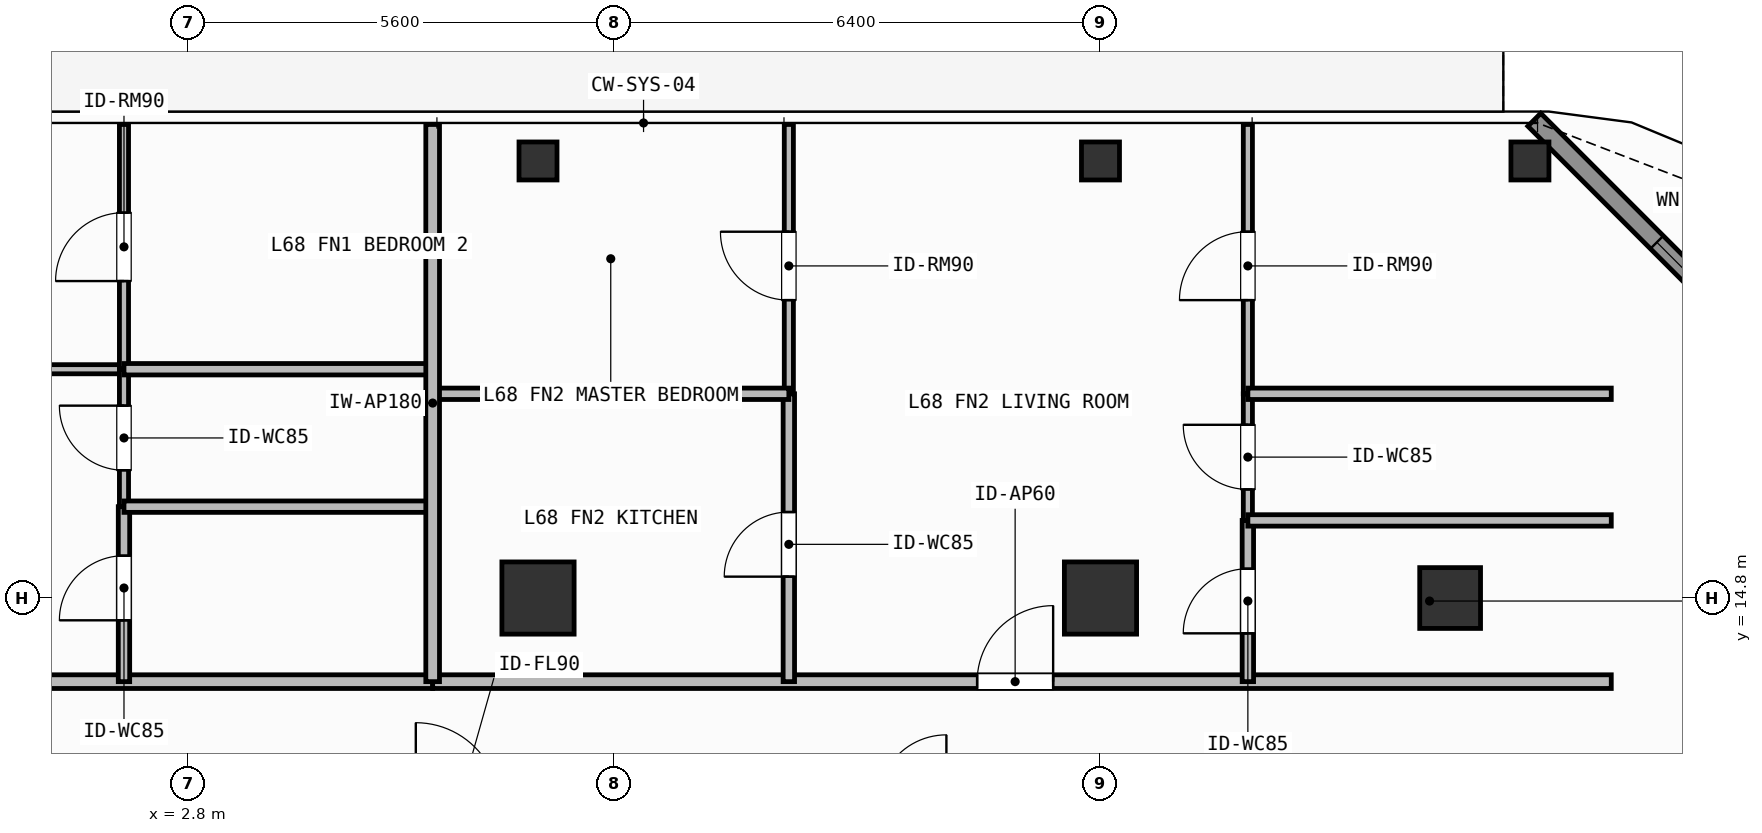
"""IFC4 building model, lengths in metres.
Left out: names, types, materials, properties, quantities, classifications, styles, units other than length and angle.
Written with IfcOpenShell. Run it as: python <this file> out.ifc"""

import sys

from ifc_helpers import new_model, si_unit, direction, frame, frame_2d, origin, origin_2d, place, context, subcontext, project, spatial, rectangle, hollow_rectangle, extrude, element, fill, save


model = new_model("IFC4")
c1 = context("Model", 3, precision=1e-05, world=origin(), true_north=direction((0.0, 1.0)))
c2 = subcontext(c1, "Body", "Model", "MODEL_VIEW")
j1 = project(units=[si_unit("LENGTHUNIT", "METRE"), si_unit("PLANEANGLEUNIT", "RADIAN")], contexts=[c1])
p1 = place(None, origin())
s1 = spatial("IfcSite", under=j1, at=p1, CompositionType="ELEMENT")
p2 = place(p1, origin())
s2 = spatial("IfcBuilding", under=s1, at=p2, CompositionType="ELEMENT")
p3 = place(p2, frame((0.0, 0.0, 278.1)))
s3 = spatial("IfcBuildingStorey", under=s2, at=p3, CompositionType="ELEMENT", Elevation=278.1)
for number, where, z_axis, x_axis in (
    (1, (7.4, 14.8, 0.0), (0.0, 0.0, 1.0), (1.0, 0.0, 0.0)),
    (2, (14.8, 14.8, 0.0), (0.0, 0.0, 1.0), (1.0, 0.0, 0.0)),
):
    element("IfcColumn", number, at=place(p3, frame(where, z_axis=z_axis, x_axis=x_axis)), inside=s3, PredefinedType="COLUMN", context=c2, shape_type="SweptSolid", body=[
        extrude(rectangle(XDim=0.95, YDim=0.95, at=origin_2d()), origin(), (0.0, 0.0, 1.0), 3.9),
    ])
p4 = place(p3, frame((19.4, 14.8, 0.0), z_axis=(0.0, 0.0, 1.0), x_axis=(1.0, 0.0, 0.0)))
e3 = element("IfcColumn", 3, at=p4, inside=s3, PredefinedType="COLUMN", context=c2, shape_type="SweptSolid", body=[
    extrude(hollow_rectangle(XDim=0.8, YDim=0.8, WallThickness=0.036, at=origin_2d()), origin(), (0.0, 0.0, 1.0), 3.9),
])
for number, where, z_axis, x_axis in (
    (4, (20.45, 20.55, 0.0), (0.0, 0.0, 1.0), (1.0, 0.0, 0.0)),
    (5, (7.4, 20.55, 0.0), (0.0, 0.0, 1.0), (1.0, 0.0, 0.0)),
    (6, (14.8, 20.55, 0.0), (0.0, 0.0, 1.0), (1.0, 0.0, 0.0)),
):
    element("IfcColumn", number, at=place(p3, frame(where, z_axis=z_axis, x_axis=x_axis)), inside=s3, PredefinedType="COLUMN", context=c2, shape_type="SweptSolid", body=[
        extrude(hollow_rectangle(XDim=0.5, YDim=0.5, WallThickness=0.025, at=origin_2d()), origin(), (0.0, 0.0, 1.0), 3.9),
    ])
p5 = place(p3, frame((20.508, 21.092, 0.0), z_axis=(0.0, 0.0, 1.0), x_axis=(0.707126925818, -0.707086635981, 0.0)))
e7 = element("IfcWall", 7, at=p5, inside=s3, PredefinedType="SOLIDWALL", context=c2, shape_type="SweptSolid", body=[
    extrude(rectangle(XDim=6.06, YDim=0.24, at=frame_2d((3.03, 0.0))), origin(), (0.0, 0.0, 1.0), 3.68),
])
p6 = place(p5, frame((2.28, 0.0, 0.8)))
e8 = element("IfcOpeningElement", 8, at=p6, cuts=e7, PredefinedType="OPENING", context=c2, shape_type="SweptSolid", body=[
    extrude(rectangle(XDim=1.5, YDim=1.85, at=frame_2d((0.75, 0.925))), frame((0.0, 0.13, 0.0), z_axis=(0.0, -1.0, 0.0), x_axis=(1.0, 0.0, 0.0)), (0.0, 0.0, 1.0), 0.26),
])
p7 = place(p3, frame((-13.72, 13.7, 0.0), z_axis=(0.0, 0.0, 1.0), x_axis=(1.0, 0.0, 0.0)))
e9 = element("IfcWall", 9, at=p7, inside=s3, PredefinedType="PARTITIONING", context=c2, shape_type="SweptSolid", body=[
    extrude(rectangle(XDim=19.734, YDim=0.18, at=frame_2d((9.867, 0.0))), origin(), (0.0, 0.0, 1.0), 3.68),
])
p8 = place(p7, frame((9.456, 0.0, 0.0)))
e10 = element("IfcOpeningElement", 10, at=p8, cuts=e9, PredefinedType="OPENING", context=c2, shape_type="SweptSolid", body=[
    extrude(rectangle(XDim=1.0, YDim=2.2, at=frame_2d((0.5, 1.1))), frame((0.0, 0.1, 0.0), z_axis=(0.0, -1.0, 0.0), x_axis=(1.0, 0.0, 0.0)), (0.0, 0.0, 1.0), 0.2),
])
p9 = place(p3, frame((-9.34, 17.81, 0.0), z_axis=(0.0, 0.0, 1.0), x_axis=(1.0, 0.0, 0.0)))
e11 = element("IfcWall", 11, at=p9, inside=s3, PredefinedType="PARTITIONING", context=c2, shape_type="SweptSolid", body=[
    extrude(rectangle(XDim=11.293, YDim=0.12, at=frame_2d((5.646, 0.0))), origin(), (0.0, 0.0, 1.0), 3.68),
])
p10 = place(p9, frame((5.197, 0.0, 0.0)))
e12 = element("IfcOpeningElement", 12, at=p10, cuts=e11, PredefinedType="OPENING", context=c2, shape_type="SweptSolid", body=[
    extrude(rectangle(XDim=0.9, YDim=2.1, at=frame_2d((0.45, 1.05))), frame((0.0, 0.07, 0.0), z_axis=(0.0, -1.0, 0.0), x_axis=(1.0, 0.0, 0.0)), (0.0, 0.0, 1.0), 0.14),
])
p11 = place(p3, frame((1.953, 13.7, 0.0), z_axis=(0.0, 0.0, 1.0), x_axis=(0.0, 1.0, 0.0)))
e13 = element("IfcWall", 13, at=p11, inside=s3, PredefinedType="PARTITIONING", context=c2, shape_type="SweptSolid", body=[
    extrude(rectangle(XDim=2.302, YDim=0.15, at=frame_2d((1.151, 0.0))), origin(), (0.0, 0.0, 1.0), 3.68),
])
p12 = place(p11, frame((0.807, 0.0, 0.0)))
e14 = element("IfcOpeningElement", 14, at=p12, cuts=e13, PredefinedType="OPENING", context=c2, shape_type="SweptSolid", body=[
    extrude(rectangle(XDim=0.85, YDim=2.1, at=frame_2d((0.425, 1.05))), frame((0.0, 0.085, 0.0), z_axis=(0.0, -1.0, 0.0), x_axis=(1.0, 0.0, 0.0)), (0.0, 0.0, 1.0), 0.17),
])
p13 = place(p3, frame((1.953, 16.002, 0.0), z_axis=(0.0, 0.0, 1.0), x_axis=(0.0, 1.0, 0.0)))
e15 = element("IfcWall", 15, at=p13, inside=s3, PredefinedType="PARTITIONING", context=c2, shape_type="SweptSolid", body=[
    extrude(rectangle(XDim=1.808, YDim=0.12, at=frame_2d((0.904, 0.0))), origin(), (0.0, 0.0, 1.0), 3.68),
])
p14 = place(p13, frame((0.479, 0.0, 0.0)))
e16 = element("IfcOpeningElement", 16, at=p14, cuts=e15, PredefinedType="OPENING", context=c2, shape_type="SweptSolid", body=[
    extrude(rectangle(XDim=0.85, YDim=2.1, at=frame_2d((0.425, 1.05))), frame((0.0, 0.07, 0.0), z_axis=(0.0, -1.0, 0.0), x_axis=(1.0, 0.0, 0.0)), (0.0, 0.0, 1.0), 0.14),
])
p15 = place(p3, frame((1.953, 17.81, 0.0), z_axis=(0.0, 0.0, 1.0), x_axis=(0.0, 1.0, 0.0)))
e17 = element("IfcWall", 17, at=p15, inside=s3, PredefinedType="PARTITIONING", context=c2, shape_type="SweptSolid", body=[
    extrude(rectangle(XDim=3.22, YDim=0.12, at=frame_2d((1.61, 0.0))), origin(), (0.0, 0.0, 1.0), 3.68),
])
p16 = place(p15, frame((1.16, 0.0, 0.0)))
e18 = element("IfcOpeningElement", 18, at=p16, cuts=e17, PredefinedType="OPENING", context=c2, shape_type="SweptSolid", body=[
    extrude(rectangle(XDim=0.9, YDim=2.1, at=frame_2d((0.45, 1.05))), frame((0.0, 0.07, 0.0), z_axis=(0.0, -1.0, 0.0), x_axis=(1.0, 0.0, 0.0)), (0.0, 0.0, 1.0), 0.14),
])
p17 = place(p3, frame((6.014, 13.7, 0.0), z_axis=(0.0, 0.0, 1.0), x_axis=(1.0, 0.0, 0.0)))
e19 = element("IfcWall", 19, at=p17, inside=s3, PredefinedType="PARTITIONING", context=c2, shape_type="SweptSolid", body=[
    extrude(rectangle(XDim=15.506, YDim=0.18, at=frame_2d((7.753, 0.0))), origin(), (0.0, 0.0, 1.0), 3.68),
])
p18 = place(p17, frame((7.163, 0.0, 0.0)))
e20 = element("IfcOpeningElement", 20, at=p18, cuts=e19, PredefinedType="OPENING", context=c2, shape_type="SweptSolid", body=[
    extrude(rectangle(XDim=1.0, YDim=2.2, at=frame_2d((0.5, 1.1))), frame((0.0, 0.1, 0.0), z_axis=(0.0, -1.0, 0.0), x_axis=(1.0, 0.0, 0.0)), (0.0, 0.0, 1.0), 0.2),
])
p19 = place(p3, frame((10.7, 13.7, 0.0), z_axis=(0.0, 0.0, 1.0), x_axis=(0.0, 1.0, 0.0)))
e21 = element("IfcWall", 21, at=p19, inside=s3, PredefinedType="PARTITIONING", context=c2, shape_type="SweptSolid", body=[
    extrude(rectangle(XDim=3.787, YDim=0.15, at=frame_2d((1.894, 0.0))), origin(), (0.0, 0.0, 1.0), 3.68),
])
p20 = place(p19, frame((1.381, 0.0, 0.0)))
e22 = element("IfcOpeningElement", 22, at=p20, cuts=e21, PredefinedType="OPENING", context=c2, shape_type="SweptSolid", body=[
    extrude(rectangle(XDim=0.85, YDim=2.1, at=frame_2d((0.425, 1.05))), frame((0.0, 0.085, 0.0), z_axis=(0.0, -1.0, 0.0), x_axis=(1.0, 0.0, 0.0)), (0.0, 0.0, 1.0), 0.17),
])
p21 = place(p3, frame((10.7, 17.487, 0.0), z_axis=(0.0, 0.0, 1.0), x_axis=(0.0, 1.0, 0.0)))
e23 = element("IfcWall", 23, at=p21, inside=s3, PredefinedType="PARTITIONING", context=c2, shape_type="SweptSolid", body=[
    extrude(rectangle(XDim=3.543, YDim=0.12, at=frame_2d((1.771, 0.0))), origin(), (0.0, 0.0, 1.0), 3.68),
])
p22 = place(p21, frame((1.232, 0.0, 0.0)))
e24 = element("IfcOpeningElement", 24, at=p22, cuts=e23, PredefinedType="OPENING", context=c2, shape_type="SweptSolid", body=[
    extrude(rectangle(XDim=0.9, YDim=2.1, at=frame_2d((0.45, 1.05))), frame((0.0, 0.07, 0.0), z_axis=(0.0, -1.0, 0.0), x_axis=(1.0, 0.0, 0.0)), (0.0, 0.0, 1.0), 0.14),
])
p23 = place(p3, frame((16.739, 13.7, 0.0), z_axis=(0.0, 0.0, 1.0), x_axis=(0.0, 1.0, 0.0)))
e25 = element("IfcWall", 25, at=p23, inside=s3, PredefinedType="PARTITIONING", context=c2, shape_type="SweptSolid", body=[
    extrude(rectangle(XDim=2.121, YDim=0.15, at=frame_2d((1.061, 0.0))), origin(), (0.0, 0.0, 1.0), 3.68),
])
p24 = place(p23, frame((0.635, 0.0, 0.0)))
e26 = element("IfcOpeningElement", 26, at=p24, cuts=e25, PredefinedType="OPENING", context=c2, shape_type="SweptSolid", body=[
    extrude(rectangle(XDim=0.85, YDim=2.1, at=frame_2d((0.425, 1.05))), frame((0.0, 0.085, 0.0), z_axis=(0.0, -1.0, 0.0), x_axis=(1.0, 0.0, 0.0)), (0.0, 0.0, 1.0), 0.17),
])
p25 = place(p3, frame((16.739, 15.821, 0.0), z_axis=(0.0, 0.0, 1.0), x_axis=(0.0, 1.0, 0.0)))
e27 = element("IfcWall", 27, at=p25, inside=s3, PredefinedType="PARTITIONING", context=c2, shape_type="SweptSolid", body=[
    extrude(rectangle(XDim=1.666, YDim=0.12, at=frame_2d((0.833, 0.0))), origin(), (0.0, 0.0, 1.0), 3.68),
])
p26 = place(p25, frame((0.408, 0.0, 0.0)))
e28 = element("IfcOpeningElement", 28, at=p26, cuts=e27, PredefinedType="OPENING", context=c2, shape_type="SweptSolid", body=[
    extrude(rectangle(XDim=0.85, YDim=2.1, at=frame_2d((0.425, 1.05))), frame((0.0, 0.07, 0.0), z_axis=(0.0, -1.0, 0.0), x_axis=(1.0, 0.0, 0.0)), (0.0, 0.0, 1.0), 0.14),
])
p27 = place(p3, frame((16.739, 17.487, 0.0), z_axis=(0.0, 0.0, 1.0), x_axis=(0.0, 1.0, 0.0)))
e29 = element("IfcWall", 29, at=p27, inside=s3, PredefinedType="PARTITIONING", context=c2, shape_type="SweptSolid", body=[
    extrude(rectangle(XDim=3.543, YDim=0.12, at=frame_2d((1.771, 0.0))), origin(), (0.0, 0.0, 1.0), 3.68),
])
p28 = place(p27, frame((1.232, 0.0, 0.0)))
e30 = element("IfcOpeningElement", 30, at=p28, cuts=e29, PredefinedType="OPENING", context=c2, shape_type="SweptSolid", body=[
    extrude(rectangle(XDim=0.9, YDim=2.1, at=frame_2d((0.45, 1.05))), frame((0.0, 0.07, 0.0), z_axis=(0.0, -1.0, 0.0), x_axis=(1.0, 0.0, 0.0)), (0.0, 0.0, 1.0), 0.14),
])
for number, where, z_axis, x_axis in (
    (31, (1.953, 16.002, 0.0), (0.0, 0.0, 1.0), (1.0, 0.0, 0.0)),
    (32, (1.953, 17.81, 0.0), (0.0, 0.0, 1.0), (1.0, 0.0, 0.0)),
):
    element("IfcWall", number, at=place(p3, frame(where, z_axis=z_axis, x_axis=x_axis)), inside=s3, PredefinedType="PARTITIONING", context=c2, shape_type="SweptSolid", body=[
        extrude(rectangle(XDim=4.061, YDim=0.15, at=frame_2d((2.031, 0.0))), origin(), (0.0, 0.0, 1.0), 3.68),
    ])
p29 = place(p3, frame((6.014, 17.487, 0.0), z_axis=(0.0, 0.0, 1.0), x_axis=(1.0, 0.0, 0.0)))
e33 = element("IfcWall", 33, at=p29, inside=s3, PredefinedType="PARTITIONING", context=c2, shape_type="SweptSolid", body=[
    extrude(rectangle(XDim=4.686, YDim=0.15, at=frame_2d((2.343, 0.0))), origin(), (0.0, 0.0, 1.0), 3.68),
])
for number, where, z_axis, x_axis in (
    (34, (16.739, 15.821, 0.0), (0.0, 0.0, 1.0), (1.0, 0.0, 0.0)),
    (35, (16.739, 17.487, 0.0), (0.0, 0.0, 1.0), (1.0, 0.0, 0.0)),
):
    element("IfcWall", number, at=place(p3, frame(where, z_axis=z_axis, x_axis=x_axis)), inside=s3, PredefinedType="PARTITIONING", context=c2, shape_type="SweptSolid", body=[
        extrude(rectangle(XDim=4.781, YDim=0.15, at=frame_2d((2.391, 0.0))), origin(), (0.0, 0.0, 1.0), 3.68),
    ])
p30 = place(p3, frame((6.014, 13.7, 0.0), z_axis=(0.0, 0.0, 1.0), x_axis=(0.0, 1.0, 0.0)))
e36 = element("IfcWall", 36, at=p30, inside=s3, PredefinedType="PARTITIONING", context=c2, shape_type="SweptSolid", body=[
    extrude(rectangle(XDim=7.33, YDim=0.18, at=frame_2d((3.665, 0.0))), origin(), (0.0, 0.0, 1.0), 3.68),
])
p31 = place(p6, origin())
e37 = element("IfcWindow", 37, at=p31, inside=s3, PartitioningType="SINGLE_PANEL", PredefinedType="WINDOW", context=c2, shape_type="SweptSolid", body=[
    extrude(rectangle(XDim=1.5, YDim=1.85, at=frame_2d((0.75, 0.925))), frame((0.0, 0.03, 0.0), z_axis=(0.0, -1.0, 0.0), x_axis=(1.0, 0.0, 0.0)), (0.0, 0.0, 1.0), 0.06),
])
fill(e8, e37)
p32 = place(p12, origin())
e38 = element("IfcDoor", 38, at=p32, inside=s3, OperationType="SINGLE_SWING_LEFT", PredefinedType="DOOR", context=c2, shape_type="SweptSolid", body=[
    extrude(rectangle(XDim=0.85, YDim=2.1, at=frame_2d((0.425, 1.05))), frame((0.0, 0.025, 0.0), z_axis=(0.0, -1.0, 0.0), x_axis=(1.0, 0.0, 0.0)), (0.0, 0.0, 1.0), 0.05),
])
fill(e14, e38)
p33 = place(p14, origin())
e39 = element("IfcDoor", 39, at=p33, inside=s3, OperationType="SINGLE_SWING_RIGHT", PredefinedType="DOOR", context=c2, shape_type="SweptSolid", body=[
    extrude(rectangle(XDim=0.85, YDim=2.1, at=frame_2d((0.425, 1.05))), frame((0.0, 0.025, 0.0), z_axis=(0.0, -1.0, 0.0), x_axis=(1.0, 0.0, 0.0)), (0.0, 0.0, 1.0), 0.05),
])
fill(e16, e39)
p34 = place(p16, origin())
e40 = element("IfcDoor", 40, at=p34, inside=s3, OperationType="SINGLE_SWING_LEFT", PredefinedType="DOOR", context=c2, shape_type="SweptSolid", body=[
    extrude(rectangle(XDim=0.9, YDim=2.1, at=frame_2d((0.45, 1.05))), frame((0.0, 0.025, 0.0), z_axis=(0.0, -1.0, 0.0), x_axis=(1.0, 0.0, 0.0)), (0.0, 0.0, 1.0), 0.05),
])
fill(e18, e40)
p35 = place(p18, origin())
e41 = element("IfcDoor", 41, at=p35, inside=s3, OperationType="SINGLE_SWING_RIGHT", PredefinedType="DOOR", context=c2, shape_type="SweptSolid", body=[
    extrude(rectangle(XDim=1.0, YDim=2.2, at=frame_2d((0.5, 1.1))), frame((0.0, 0.025, 0.0), z_axis=(0.0, -1.0, 0.0), x_axis=(1.0, 0.0, 0.0)), (0.0, 0.0, 1.0), 0.05),
])
fill(e20, e41)
p36 = place(p20, origin())
e42 = element("IfcDoor", 42, at=p36, inside=s3, OperationType="SINGLE_SWING_LEFT", PredefinedType="DOOR", context=c2, shape_type="SweptSolid", body=[
    extrude(rectangle(XDim=0.85, YDim=2.1, at=frame_2d((0.425, 1.05))), frame((0.0, 0.025, 0.0), z_axis=(0.0, -1.0, 0.0), x_axis=(1.0, 0.0, 0.0)), (0.0, 0.0, 1.0), 0.05),
])
fill(e22, e42)
p37 = place(p22, origin())
e43 = element("IfcDoor", 43, at=p37, inside=s3, OperationType="SINGLE_SWING_RIGHT", PredefinedType="DOOR", context=c2, shape_type="SweptSolid", body=[
    extrude(rectangle(XDim=0.9, YDim=2.1, at=frame_2d((0.45, 1.05))), frame((0.0, 0.025, 0.0), z_axis=(0.0, -1.0, 0.0), x_axis=(1.0, 0.0, 0.0)), (0.0, 0.0, 1.0), 0.05),
])
fill(e24, e43)
p38 = place(p24, origin())
e44 = element("IfcDoor", 44, at=p38, inside=s3, OperationType="SINGLE_SWING_LEFT", PredefinedType="DOOR", context=c2, shape_type="SweptSolid", body=[
    extrude(rectangle(XDim=0.85, YDim=2.1, at=frame_2d((0.425, 1.05))), frame((0.0, 0.025, 0.0), z_axis=(0.0, -1.0, 0.0), x_axis=(1.0, 0.0, 0.0)), (0.0, 0.0, 1.0), 0.05),
])
fill(e26, e44)
p39 = place(p26, origin())
e45 = element("IfcDoor", 45, at=p39, inside=s3, OperationType="SINGLE_SWING_RIGHT", PredefinedType="DOOR", context=c2, shape_type="SweptSolid", body=[
    extrude(rectangle(XDim=0.85, YDim=2.1, at=frame_2d((0.425, 1.05))), frame((0.0, 0.025, 0.0), z_axis=(0.0, -1.0, 0.0), x_axis=(1.0, 0.0, 0.0)), (0.0, 0.0, 1.0), 0.05),
])
fill(e28, e45)
p40 = place(p28, origin())
e46 = element("IfcDoor", 46, at=p40, inside=s3, OperationType="SINGLE_SWING_LEFT", PredefinedType="DOOR", context=c2, shape_type="SweptSolid", body=[
    extrude(rectangle(XDim=0.9, YDim=2.1, at=frame_2d((0.45, 1.05))), frame((0.0, 0.025, 0.0), z_axis=(0.0, -1.0, 0.0), x_axis=(1.0, 0.0, 0.0)), (0.0, 0.0, 1.0), 0.05),
])
fill(e30, e46)
save(model, sys.argv[1])
